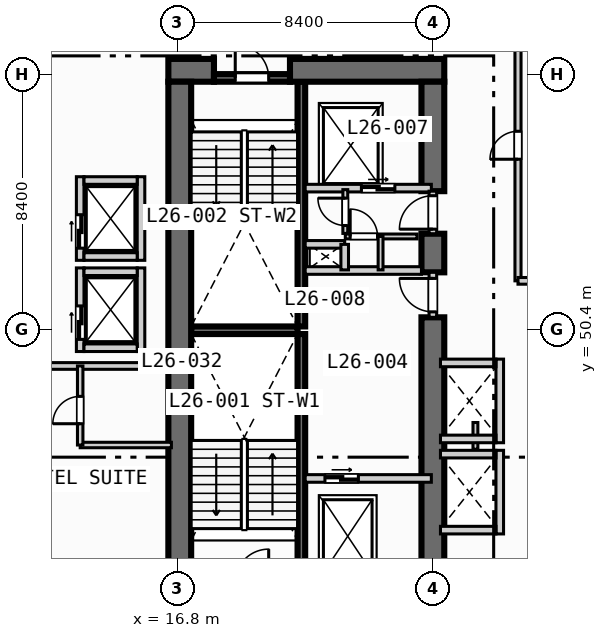
"""IFC4 building model, lengths in metres.
Left out: names, types, materials, properties, quantities, classifications, styles, units other than length and angle.
Written with IfcOpenShell. Run it as: python <this file> out.ifc"""

import sys

from ifc_helpers import new_model, si_unit, direction, frame, frame_2d, origin, place, context, subcontext, project, spatial, rectangle, extrude, element, fill, save


model = new_model("IFC4")
c1 = context("Model", 3, precision=1e-05, world=origin(), true_north=direction((0.0, 1.0)))
c2 = subcontext(c1, "Body", "Model", "MODEL_VIEW")
j1 = project(units=[si_unit("LENGTHUNIT", "METRE"), si_unit("PLANEANGLEUNIT", "RADIAN")], contexts=[c1])
p1 = place(None, origin())
s1 = spatial("IfcSite", under=j1, at=p1, CompositionType="ELEMENT")
p2 = place(p1, origin())
s2 = spatial("IfcBuilding", under=s1, at=p2, CompositionType="ELEMENT")
p3 = place(p2, frame((0.0, 0.0, 111.4)))
s3 = spatial("IfcBuildingStorey", under=s2, at=p3, CompositionType="ELEMENT", Elevation=111.4)
for number, where, z_axis, x_axis in (
    (1, (20.875, 42.2, 0.0), (0.0, 0.0, 1.0), (0.0, 1.0, 0.0)),
    (2, (20.875, 50.5, 0.0), (0.0, 0.0, 1.0), (0.0, 1.0, 0.0)),
):
    element("IfcWall", number, at=place(p3, frame(where, z_axis=z_axis, x_axis=x_axis)), inside=s3, PredefinedType="SOLIDWALL", context=c2, shape_type="SweptSolid", body=[
        extrude(rectangle(XDim=8.05, YDim=0.25, at=frame_2d((4.025, 0.0))), origin(), (0.0, 0.0, 1.0), 3.55),
    ])
p4 = place(p3, frame((17.25, 50.375, 0.0), z_axis=(0.0, 0.0, 1.0), x_axis=(1.0, 0.0, 0.0)))
e3 = element("IfcWall", 3, at=p4, inside=s3, PredefinedType="SOLIDWALL", context=c2, shape_type="SweptSolid", body=[
    extrude(rectangle(XDim=3.5, YDim=0.25, at=frame_2d((1.75, 0.0))), origin(), (0.0, 0.0, 1.0), 3.55),
])
p5 = place(p3, frame((16.5, 58.925, 0.0), z_axis=(0.0, 0.0, 1.0), x_axis=(1.0, 0.0, 0.0)))
e4 = element("IfcWall", 4, at=p5, inside=s3, PredefinedType="SHEAR", context=c2, shape_type="SweptSolid", body=[
    extrude(rectangle(XDim=1.5, YDim=0.75, at=frame_2d((0.75, 0.0))), origin(), (0.0, 0.0, 1.0), 3.55),
])
p6 = place(p3, frame((20.5, 58.925, 0.0), z_axis=(0.0, 0.0, 1.0), x_axis=(1.0, 0.0, 0.0)))
e5 = element("IfcWall", 5, at=p6, inside=s3, PredefinedType="SHEAR", context=c2, shape_type="SweptSolid", body=[
    extrude(rectangle(XDim=5.075, YDim=0.75, at=frame_2d((2.538, 0.0))), origin(), (0.0, 0.0, 1.0), 3.55),
])
p7 = place(p3, frame((16.875, 42.2, 0.0), z_axis=(0.0, 0.0, 1.0), x_axis=(0.0, 1.0, 0.0)))
e6 = element("IfcWall", 6, at=p7, inside=s3, PredefinedType="SHEAR", context=c2, shape_type="SweptSolid", body=[
    extrude(rectangle(XDim=16.35, YDim=0.75, at=frame_2d((8.175, 0.0))), origin(), (0.0, 0.0, 1.0), 3.55),
])
p8 = place(p3, frame((25.2, 42.2, 0.0), z_axis=(0.0, 0.0, 1.0), x_axis=(0.0, 1.0, 0.0)))
e7 = element("IfcWall", 7, at=p8, inside=s3, PredefinedType="SHEAR", context=c2, shape_type="SweptSolid", body=[
    extrude(rectangle(XDim=8.6, YDim=0.75, at=frame_2d((4.3, 0.0))), origin(), (0.0, 0.0, 1.0), 3.55),
])
p9 = place(p3, frame((25.2, 52.28, 0.0), z_axis=(0.0, 0.0, 1.0), x_axis=(0.0, 1.0, 0.0)))
e8 = element("IfcWall", 8, at=p9, inside=s3, PredefinedType="SHEAR", context=c2, shape_type="SweptSolid", body=[
    extrude(rectangle(XDim=1.27, YDim=0.75, at=frame_2d((0.635, 0.0))), origin(), (0.0, 0.0, 1.0), 3.55),
])
p10 = place(p3, frame((25.2, 54.95, 0.0), z_axis=(0.0, 0.0, 1.0), x_axis=(0.0, 1.0, 0.0)))
e9 = element("IfcWall", 9, at=p10, inside=s3, PredefinedType="SHEAR", context=c2, shape_type="SweptSolid", body=[
    extrude(rectangle(XDim=3.6, YDim=0.75, at=frame_2d((1.8, 0.0))), origin(), (0.0, 0.0, 1.0), 3.55),
])
p11 = place(p3, frame((18.0, 58.675, 0.0), z_axis=(0.0, 0.0, 1.0), x_axis=(1.0, 0.0, 0.0)))
e10 = element("IfcWall", 10, at=p11, inside=s3, PredefinedType="SOLIDWALL", context=c2, shape_type="SweptSolid", body=[
    extrude(rectangle(XDim=2.5, YDim=0.25, at=frame_2d((1.25, 0.0))), origin(), (0.0, 0.0, 1.0), 3.55),
])
p12 = place(p11, frame((0.7, 0.0, 0.0)))
e11 = element("IfcOpeningElement", 11, at=p12, cuts=e10, PredefinedType="OPENING", context=c2, shape_type="SweptSolid", body=[
    extrude(rectangle(XDim=1.1, YDim=2.15, at=frame_2d((0.55, 1.075))), frame((0.0, 0.135, 0.0), z_axis=(0.0, -1.0, 0.0), x_axis=(1.0, 0.0, 0.0)), (0.0, 0.0, 1.0), 0.27),
])
p13 = place(p3, frame((21.0, 45.5, 0.0), z_axis=(0.0, 0.0, 1.0), x_axis=(1.0, 0.0, 0.0)))
e12 = element("IfcWall", 12, at=p13, inside=s3, PredefinedType="SOLIDWALL", context=c2, shape_type="SweptSolid", body=[
    extrude(rectangle(XDim=4.15, YDim=0.25, at=frame_2d((2.075, 0.0))), origin(), (0.0, 0.0, 1.0), 3.55),
])
p14 = place(p13, frame((0.65, 0.0, 0.0)))
e13 = element("IfcOpeningElement", 13, at=p14, cuts=e12, PredefinedType="OPENING", context=c2, shape_type="SweptSolid", body=[
    extrude(rectangle(XDim=1.1, YDim=2.15, at=frame_2d((0.55, 1.075))), frame((0.0, 0.135, 0.0), z_axis=(0.0, -1.0, 0.0), x_axis=(1.0, 0.0, 0.0)), (0.0, 0.0, 1.0), 0.27),
])
p15 = place(p3, frame((25.2, 50.8, 0.0), z_axis=(0.0, 0.0, 1.0), x_axis=(0.0, 1.0, 0.0)))
e14 = element("IfcWall", 14, at=p15, inside=s3, PredefinedType="SOLIDWALL", context=c2, shape_type="SweptSolid", body=[
    extrude(rectangle(XDim=1.48, YDim=0.25, at=frame_2d((0.74, 0.0))), origin(), (0.0, 0.0, 1.0), 3.55),
])
p16 = place(p15, frame((0.18, 0.0, 0.0)))
e15 = element("IfcOpeningElement", 15, at=p16, cuts=e14, PredefinedType="OPENING", context=c2, shape_type="SweptSolid", body=[
    extrude(rectangle(XDim=1.1, YDim=2.15, at=frame_2d((0.55, 1.075))), frame((0.0, 0.135, 0.0), z_axis=(0.0, -1.0, 0.0), x_axis=(1.0, 0.0, 0.0)), (0.0, 0.0, 1.0), 0.27),
])
p17 = place(p3, frame((21.0, 52.34, 0.0), z_axis=(0.0, 0.0, 1.0), x_axis=(1.0, 0.0, 0.0)))
e16 = element("IfcWall", 16, at=p17, inside=s3, PredefinedType="SOLIDWALL", context=c2, shape_type="SweptSolid", body=[
    extrude(rectangle(XDim=3.825, YDim=0.25, at=frame_2d((1.913, 0.0))), origin(), (0.0, 0.0, 1.0), 3.55),
])
p18 = place(p3, frame((21.0, 55.05, 0.0), z_axis=(0.0, 0.0, 1.0), x_axis=(1.0, 0.0, 0.0)))
e17 = element("IfcWall", 17, at=p18, inside=s3, PredefinedType="SOLIDWALL", context=c2, shape_type="SweptSolid", body=[
    extrude(rectangle(XDim=4.15, YDim=0.25, at=frame_2d((2.075, 0.0))), origin(), (0.0, 0.0, 1.0), 3.55),
])
p19 = place(p18, frame((1.85, 0.0, 0.0)))
e18 = element("IfcOpeningElement", 18, at=p19, cuts=e17, PredefinedType="OPENING", context=c2, shape_type="SweptSolid", body=[
    extrude(rectangle(XDim=1.1, YDim=2.15, at=frame_2d((0.55, 1.075))), frame((0.0, 0.135, 0.0), z_axis=(0.0, -1.0, 0.0), x_axis=(1.0, 0.0, 0.0)), (0.0, 0.0, 1.0), 0.27),
])
p20 = place(p3, frame((25.2, 53.55, 0.0), z_axis=(0.0, 0.0, 1.0), x_axis=(0.0, 1.0, 0.0)))
e19 = element("IfcWall", 19, at=p20, inside=s3, PredefinedType="SOLIDWALL", context=c2, shape_type="SweptSolid", body=[
    extrude(rectangle(XDim=1.4, YDim=0.25, at=frame_2d((0.7, 0.0))), origin(), (0.0, 0.0, 1.0), 3.55),
])
p21 = place(p20, frame((0.15, 0.0, 0.0)))
e20 = element("IfcOpeningElement", 20, at=p21, cuts=e19, PredefinedType="OPENING", context=c2, shape_type="SweptSolid", body=[
    extrude(rectangle(XDim=1.1, YDim=2.15, at=frame_2d((0.55, 1.075))), frame((0.0, 0.135, 0.0), z_axis=(0.0, -1.0, 0.0), x_axis=(1.0, 0.0, 0.0)), (0.0, 0.0, 1.0), 0.27),
])
p22 = place(p3, frame((21.0, 53.2, 0.0), z_axis=(0.0, 0.0, 1.0), x_axis=(1.0, 0.0, 0.0)))
e21 = element("IfcWall", 21, at=p22, inside=s3, PredefinedType="SOLIDWALL", context=c2, shape_type="SweptSolid", body=[
    extrude(rectangle(XDim=1.3, YDim=0.25, at=frame_2d((0.65, 0.0))), origin(), (0.0, 0.0, 1.0), 3.55),
])
p23 = place(p3, frame((22.3, 52.36, 0.0), z_axis=(0.0, 0.0, 1.0), x_axis=(0.0, 1.0, 0.0)))
e22 = element("IfcWall", 22, at=p23, inside=s3, PredefinedType="SOLIDWALL", context=c2, shape_type="SweptSolid", body=[
    extrude(rectangle(XDim=0.84, YDim=0.25, at=frame_2d((0.42, 0.0))), origin(), (0.0, 0.0, 1.0), 3.55),
])
p24 = place(p3, frame((22.32, 53.56, 0.0), z_axis=(0.0, 0.0, 1.0), x_axis=(0.0, 1.0, 0.0)))
e23 = element("IfcWall", 23, at=p24, inside=s3, PredefinedType="PARTITIONING", context=c2, shape_type="SweptSolid", body=[
    extrude(rectangle(XDim=1.44, YDim=0.16, at=frame_2d((0.72, 0.0))), origin(), (0.0, 0.0, 1.0), 3.55),
])
p25 = place(p24, frame((0.26, 0.0, 0.0)))
e24 = element("IfcOpeningElement", 24, at=p25, cuts=e23, PredefinedType="OPENING", context=c2, shape_type="SweptSolid", body=[
    extrude(rectangle(XDim=0.9, YDim=2.1, at=frame_2d((0.45, 1.05))), frame((0.0, 0.09, 0.0), z_axis=(0.0, -1.0, 0.0), x_axis=(1.0, 0.0, 0.0)), (0.0, 0.0, 1.0), 0.18),
])
p26 = place(p3, frame((22.32, 53.46, 0.0), z_axis=(0.0, 0.0, 1.0), x_axis=(1.0, 0.0, 0.0)))
e25 = element("IfcWall", 25, at=p26, inside=s3, PredefinedType="PARTITIONING", context=c2, shape_type="SweptSolid", body=[
    extrude(rectangle(XDim=2.36, YDim=0.16, at=frame_2d((1.18, 0.0))), origin(), (0.0, 0.0, 1.0), 3.55),
])
p27 = place(p26, frame((0.16, 0.0, 0.0)))
e26 = element("IfcOpeningElement", 26, at=p27, cuts=e25, PredefinedType="OPENING", context=c2, shape_type="SweptSolid", body=[
    extrude(rectangle(XDim=0.9, YDim=2.1, at=frame_2d((0.45, 1.05))), frame((0.0, 0.09, 0.0), z_axis=(0.0, -1.0, 0.0), x_axis=(1.0, 0.0, 0.0)), (0.0, 0.0, 1.0), 0.18),
])
p28 = place(p3, frame((23.48, 52.36, 0.0), z_axis=(0.0, 0.0, 1.0), x_axis=(0.0, 1.0, 0.0)))
e27 = element("IfcWall", 27, at=p28, inside=s3, PredefinedType="PARTITIONING", context=c2, shape_type="SweptSolid", body=[
    extrude(rectangle(XDim=1.1, YDim=0.16, at=frame_2d((0.55, 0.0))), origin(), (0.0, 0.0, 1.0), 3.55),
])
p29 = place(p3, frame((13.6, 49.675, 0.0), z_axis=(0.0, 0.0, 1.0), x_axis=(0.0, 1.0, 0.0)))
e28 = element("IfcWall", 28, at=p29, inside=s3, PredefinedType="SOLIDWALL", context=c2, shape_type="SweptSolid", body=[
    extrude(rectangle(XDim=2.75, YDim=0.25, at=frame_2d((1.375, 0.0))), origin(), (0.0, 0.0, 1.0), 3.55),
])
p30 = place(p29, frame((0.4, 0.0, 0.0)))
e29 = element("IfcOpeningElement", 29, at=p30, cuts=e28, PredefinedType="OPENING", context=c2, shape_type="SweptSolid", body=[
    extrude(rectangle(XDim=1.1, YDim=2.15, at=frame_2d((0.55, 1.075))), frame((0.0, 0.135, 0.0), z_axis=(0.0, -1.0, 0.0), x_axis=(1.0, 0.0, 0.0)), (0.0, 0.0, 1.0), 0.27),
])
p31 = place(p3, frame((15.6, 49.675, 0.0), z_axis=(0.0, 0.0, 1.0), x_axis=(0.0, 1.0, 0.0)))
e30 = element("IfcWall", 30, at=p31, inside=s3, PredefinedType="SOLIDWALL", context=c2, shape_type="SweptSolid", body=[
    extrude(rectangle(XDim=2.75, YDim=0.25, at=frame_2d((1.375, 0.0))), origin(), (0.0, 0.0, 1.0), 3.55),
])
for number, where, z_axis, x_axis in (
    (31, (13.725, 49.8, 0.0), (0.0, 0.0, 1.0), (1.0, 0.0, 0.0)),
    (32, (13.725, 52.3, 0.0), (0.0, 0.0, 1.0), (1.0, 0.0, 0.0)),
):
    element("IfcWall", number, at=place(p3, frame(where, z_axis=z_axis, x_axis=x_axis)), inside=s3, PredefinedType="SOLIDWALL", context=c2, shape_type="SweptSolid", body=[
        extrude(rectangle(XDim=1.75, YDim=0.25, at=frame_2d((0.875, 0.0))), origin(), (0.0, 0.0, 1.0), 3.55),
    ])
p32 = place(p3, frame((13.6, 52.675, 0.0), z_axis=(0.0, 0.0, 1.0), x_axis=(0.0, 1.0, 0.0)))
e33 = element("IfcWall", 33, at=p32, inside=s3, PredefinedType="SOLIDWALL", context=c2, shape_type="SweptSolid", body=[
    extrude(rectangle(XDim=2.75, YDim=0.25, at=frame_2d((1.375, 0.0))), origin(), (0.0, 0.0, 1.0), 3.55),
])
p33 = place(p32, frame((0.4, 0.0, 0.0)))
e34 = element("IfcOpeningElement", 34, at=p33, cuts=e33, PredefinedType="OPENING", context=c2, shape_type="SweptSolid", body=[
    extrude(rectangle(XDim=1.1, YDim=2.15, at=frame_2d((0.55, 1.075))), frame((0.0, 0.135, 0.0), z_axis=(0.0, -1.0, 0.0), x_axis=(1.0, 0.0, 0.0)), (0.0, 0.0, 1.0), 0.27),
])
p34 = place(p3, frame((15.6, 52.675, 0.0), z_axis=(0.0, 0.0, 1.0), x_axis=(0.0, 1.0, 0.0)))
e35 = element("IfcWall", 35, at=p34, inside=s3, PredefinedType="SOLIDWALL", context=c2, shape_type="SweptSolid", body=[
    extrude(rectangle(XDim=2.75, YDim=0.25, at=frame_2d((1.375, 0.0))), origin(), (0.0, 0.0, 1.0), 3.55),
])
for number, where, z_axis, x_axis in (
    (36, (13.725, 52.8, 0.0), (0.0, 0.0, 1.0), (1.0, 0.0, 0.0)),
    (37, (13.725, 55.3, 0.0), (0.0, 0.0, 1.0), (1.0, 0.0, 0.0)),
):
    element("IfcWall", number, at=place(p3, frame(where, z_axis=z_axis, x_axis=x_axis)), inside=s3, PredefinedType="SOLIDWALL", context=c2, shape_type="SweptSolid", body=[
        extrude(rectangle(XDim=1.75, YDim=0.25, at=frame_2d((0.875, 0.0))), origin(), (0.0, 0.0, 1.0), 3.55),
    ])
p35 = place(p3, frame((27.4, 43.675, 0.0), z_axis=(0.0, 0.0, 1.0), x_axis=(0.0, 1.0, 0.0)))
e38 = element("IfcWall", 38, at=p35, inside=s3, PredefinedType="SOLIDWALL", context=c2, shape_type="SweptSolid", body=[
    extrude(rectangle(XDim=2.75, YDim=0.25, at=frame_2d((1.375, 0.0))), origin(), (0.0, 0.0, 1.0), 3.55),
])
for number, where, z_axis, x_axis in (
    (39, (25.45, 43.8, 0.0), (0.0, 0.0, 1.0), (1.0, 0.0, 0.0)),
    (40, (25.45, 46.3, 0.0), (0.0, 0.0, 1.0), (1.0, 0.0, 0.0)),
):
    element("IfcWall", number, at=place(p3, frame(where, z_axis=z_axis, x_axis=x_axis)), inside=s3, PredefinedType="SOLIDWALL", context=c2, shape_type="SweptSolid", body=[
        extrude(rectangle(XDim=1.825, YDim=0.25, at=frame_2d((0.913, 0.0))), origin(), (0.0, 0.0, 1.0), 3.55),
    ])
p36 = place(p3, frame((26.6, 46.46, 0.0), z_axis=(0.0, 0.0, 1.0), x_axis=(0.0, 1.0, 0.0)))
e41 = element("IfcWall", 41, at=p36, inside=s3, PredefinedType="PARTITIONING", context=c2, shape_type="SweptSolid", body=[
    extrude(rectangle(XDim=0.88, YDim=0.16, at=frame_2d((0.44, 0.0))), origin(), (0.0, 0.0, 1.0), 3.55),
])
p37 = place(p3, frame((27.4, 46.675, 0.0), z_axis=(0.0, 0.0, 1.0), x_axis=(0.0, 1.0, 0.0)))
e42 = element("IfcWall", 42, at=p37, inside=s3, PredefinedType="SOLIDWALL", context=c2, shape_type="SweptSolid", body=[
    extrude(rectangle(XDim=2.75, YDim=0.25, at=frame_2d((1.375, 0.0))), origin(), (0.0, 0.0, 1.0), 3.55),
])
for number, where, z_axis, x_axis in (
    (43, (25.45, 46.8, 0.0), (0.0, 0.0, 1.0), (1.0, 0.0, 0.0)),
    (44, (25.45, 49.3, 0.0), (0.0, 0.0, 1.0), (1.0, 0.0, 0.0)),
):
    element("IfcWall", number, at=place(p3, frame(where, z_axis=z_axis, x_axis=x_axis)), inside=s3, PredefinedType="SOLIDWALL", context=c2, shape_type="SweptSolid", body=[
        extrude(rectangle(XDim=1.825, YDim=0.25, at=frame_2d((0.913, 0.0))), origin(), (0.0, 0.0, 1.0), 3.55),
    ])
p38 = place(p3, frame((0.35, 49.2, 0.0), z_axis=(0.0, 0.0, 1.0), x_axis=(1.0, 0.0, 0.0)))
e45 = element("IfcWall", 45, at=p38, inside=s3, PredefinedType="PARTITIONING", context=c2, shape_type="SweptSolid", body=[
    extrude(rectangle(XDim=16.25, YDim=0.22, at=frame_2d((8.125, 0.0))), origin(), (0.0, 0.0, 1.0), 3.55),
])
p39 = place(p3, frame((13.6, 46.6, 0.0), z_axis=(0.0, 0.0, 1.0), x_axis=(1.0, 0.0, 0.0)))
e46 = element("IfcWall", 46, at=p39, inside=s3, PredefinedType="PLUMBINGWALL", context=c2, shape_type="SweptSolid", body=[
    extrude(rectangle(XDim=3.0, YDim=0.18, at=frame_2d((1.5, 0.0))), origin(), (0.0, 0.0, 1.0), 3.55),
])
p40 = place(p3, frame((13.6, 46.6, 0.0), z_axis=(0.0, 0.0, 1.0), x_axis=(0.0, 1.0, 0.0)))
e47 = element("IfcWall", 47, at=p40, inside=s3, PredefinedType="PLUMBINGWALL", context=c2, shape_type="SweptSolid", body=[
    extrude(rectangle(XDim=2.6, YDim=0.18, at=frame_2d((1.3, 0.0))), origin(), (0.0, 0.0, 1.0), 3.55),
])
p41 = place(p40, frame((0.7, 0.0, 0.0)))
e48 = element("IfcOpeningElement", 48, at=p41, cuts=e47, PredefinedType="OPENING", context=c2, shape_type="SweptSolid", body=[
    extrude(rectangle(XDim=0.9, YDim=2.1, at=frame_2d((0.45, 1.05))), frame((0.0, 0.1, 0.0), z_axis=(0.0, -1.0, 0.0), x_axis=(1.0, 0.0, 0.0)), (0.0, 0.0, 1.0), 0.2),
])
p42 = place(p3, frame((28.0, 52.0, 0.0), z_axis=(0.0, 0.0, 1.0), x_axis=(0.0, 1.0, 0.0)))
e49 = element("IfcWall", 49, at=p42, inside=s3, PredefinedType="PARTITIONING", context=c2, shape_type="SweptSolid", body=[
    extrude(rectangle(XDim=37.0, YDim=0.2, at=frame_2d((18.5, 0.0))), origin(), (0.0, 0.0, 1.0), 3.55),
])
p43 = place(p42, frame((4.0, 0.0, 0.0)))
e50 = element("IfcOpeningElement", 50, at=p43, cuts=e49, PredefinedType="OPENING", context=c2, shape_type="SweptSolid", body=[
    extrude(rectangle(XDim=0.92, YDim=2.1, at=frame_2d((0.46, 1.05))), frame((0.0, 0.11, 0.0), z_axis=(0.0, -1.0, 0.0), x_axis=(1.0, 0.0, 0.0)), (0.0, 0.0, 1.0), 0.22),
])
p44 = place(p3, frame((28.0, 52.0, 0.0), z_axis=(0.0, 0.0, 1.0), x_axis=(1.0, 0.0, 0.0)))
e51 = element("IfcWall", 51, at=p44, inside=s3, PredefinedType="PARTITIONING", context=c2, shape_type="SweptSolid", body=[
    extrude(rectangle(XDim=5.3, YDim=0.22, at=frame_2d((2.65, 0.0))), origin(), (0.0, 0.0, 1.0), 3.55),
])
p45 = place(p12, origin())
e52 = element("IfcDoor", 52, at=p45, inside=s3, OperationType="SINGLE_SWING_LEFT", PredefinedType="DOOR", context=c2, shape_type="SweptSolid", body=[
    extrude(rectangle(XDim=1.1, YDim=2.15, at=frame_2d((0.55, 1.075))), frame((0.0, 0.025, 0.0), z_axis=(0.0, -1.0, 0.0), x_axis=(1.0, 0.0, 0.0)), (0.0, 0.0, 1.0), 0.05),
])
fill(e11, e52)
p46 = place(p14, origin())
e53 = element("IfcDoor", 53, at=p46, inside=s3, OperationType="SLIDING_TO_LEFT", PredefinedType="DOOR", context=c2, shape_type="SweptSolid", body=[
    extrude(rectangle(XDim=1.1, YDim=2.15, at=frame_2d((0.55, 1.075))), frame((0.0, 0.025, 0.0), z_axis=(0.0, -1.0, 0.0), x_axis=(1.0, 0.0, 0.0)), (0.0, 0.0, 1.0), 0.05),
])
fill(e13, e53)
p47 = place(p16, origin())
e54 = element("IfcDoor", 54, at=p47, inside=s3, OperationType="SINGLE_SWING_RIGHT", PredefinedType="DOOR", context=c2, shape_type="SweptSolid", body=[
    extrude(rectangle(XDim=1.1, YDim=2.15, at=frame_2d((0.55, 1.075))), frame((0.0, 0.025, 0.0), z_axis=(0.0, -1.0, 0.0), x_axis=(1.0, 0.0, 0.0)), (0.0, 0.0, 1.0), 0.05),
])
fill(e15, e54)
p48 = place(p19, origin())
e55 = element("IfcDoor", 55, at=p48, inside=s3, OperationType="SLIDING_TO_LEFT", PredefinedType="DOOR", context=c2, shape_type="SweptSolid", body=[
    extrude(rectangle(XDim=1.1, YDim=2.15, at=frame_2d((0.55, 1.075))), frame((0.0, 0.025, 0.0), z_axis=(0.0, -1.0, 0.0), x_axis=(1.0, 0.0, 0.0)), (0.0, 0.0, 1.0), 0.05),
])
fill(e18, e55)
p49 = place(p21, origin())
e56 = element("IfcDoor", 56, at=p49, inside=s3, OperationType="SINGLE_SWING_LEFT", PredefinedType="DOOR", context=c2, shape_type="SweptSolid", body=[
    extrude(rectangle(XDim=1.1, YDim=2.15, at=frame_2d((0.55, 1.075))), frame((0.0, 0.025, 0.0), z_axis=(0.0, -1.0, 0.0), x_axis=(1.0, 0.0, 0.0)), (0.0, 0.0, 1.0), 0.05),
])
fill(e20, e56)
p50 = place(p25, origin())
e57 = element("IfcDoor", 57, at=p50, inside=s3, OperationType="SINGLE_SWING_RIGHT", PredefinedType="DOOR", context=c2, shape_type="SweptSolid", body=[
    extrude(rectangle(XDim=0.9, YDim=2.1, at=frame_2d((0.45, 1.05))), frame((0.0, 0.025, 0.0), z_axis=(0.0, -1.0, 0.0), x_axis=(1.0, 0.0, 0.0)), (0.0, 0.0, 1.0), 0.05),
])
fill(e24, e57)
p51 = place(p27, origin())
e58 = element("IfcDoor", 58, at=p51, inside=s3, OperationType="SINGLE_SWING_LEFT", PredefinedType="DOOR", context=c2, shape_type="SweptSolid", body=[
    extrude(rectangle(XDim=0.9, YDim=2.1, at=frame_2d((0.45, 1.05))), frame((0.0, 0.025, 0.0), z_axis=(0.0, -1.0, 0.0), x_axis=(1.0, 0.0, 0.0)), (0.0, 0.0, 1.0), 0.05),
])
fill(e26, e58)
p52 = place(p30, origin())
e59 = element("IfcDoor", 59, at=p52, inside=s3, OperationType="SLIDING_TO_LEFT", PredefinedType="DOOR", context=c2, shape_type="SweptSolid", body=[
    extrude(rectangle(XDim=1.1, YDim=2.15, at=frame_2d((0.55, 1.075))), frame((0.0, 0.025, 0.0), z_axis=(0.0, -1.0, 0.0), x_axis=(1.0, 0.0, 0.0)), (0.0, 0.0, 1.0), 0.05),
])
fill(e29, e59)
p53 = place(p33, origin())
e60 = element("IfcDoor", 60, at=p53, inside=s3, OperationType="SLIDING_TO_LEFT", PredefinedType="DOOR", context=c2, shape_type="SweptSolid", body=[
    extrude(rectangle(XDim=1.1, YDim=2.15, at=frame_2d((0.55, 1.075))), frame((0.0, 0.025, 0.0), z_axis=(0.0, -1.0, 0.0), x_axis=(1.0, 0.0, 0.0)), (0.0, 0.0, 1.0), 0.05),
])
fill(e34, e60)
p54 = place(p41, origin())
e61 = element("IfcDoor", 61, at=p54, inside=s3, OperationType="SINGLE_SWING_LEFT", PredefinedType="DOOR", context=c2, shape_type="SweptSolid", body=[
    extrude(rectangle(XDim=0.9, YDim=2.1, at=frame_2d((0.45, 1.05))), frame((0.0, 0.025, 0.0), z_axis=(0.0, -1.0, 0.0), x_axis=(1.0, 0.0, 0.0)), (0.0, 0.0, 1.0), 0.05),
])
fill(e48, e61)
p55 = place(p43, origin())
e62 = element("IfcDoor", 62, at=p55, inside=s3, OperationType="SINGLE_SWING_LEFT", PredefinedType="DOOR", context=c2, shape_type="SweptSolid", body=[
    extrude(rectangle(XDim=0.92, YDim=2.1, at=frame_2d((0.46, 1.05))), frame((0.0, 0.025, 0.0), z_axis=(0.0, -1.0, 0.0), x_axis=(1.0, 0.0, 0.0)), (0.0, 0.0, 1.0), 0.05),
])
fill(e50, e62)
save(model, sys.argv[1])
